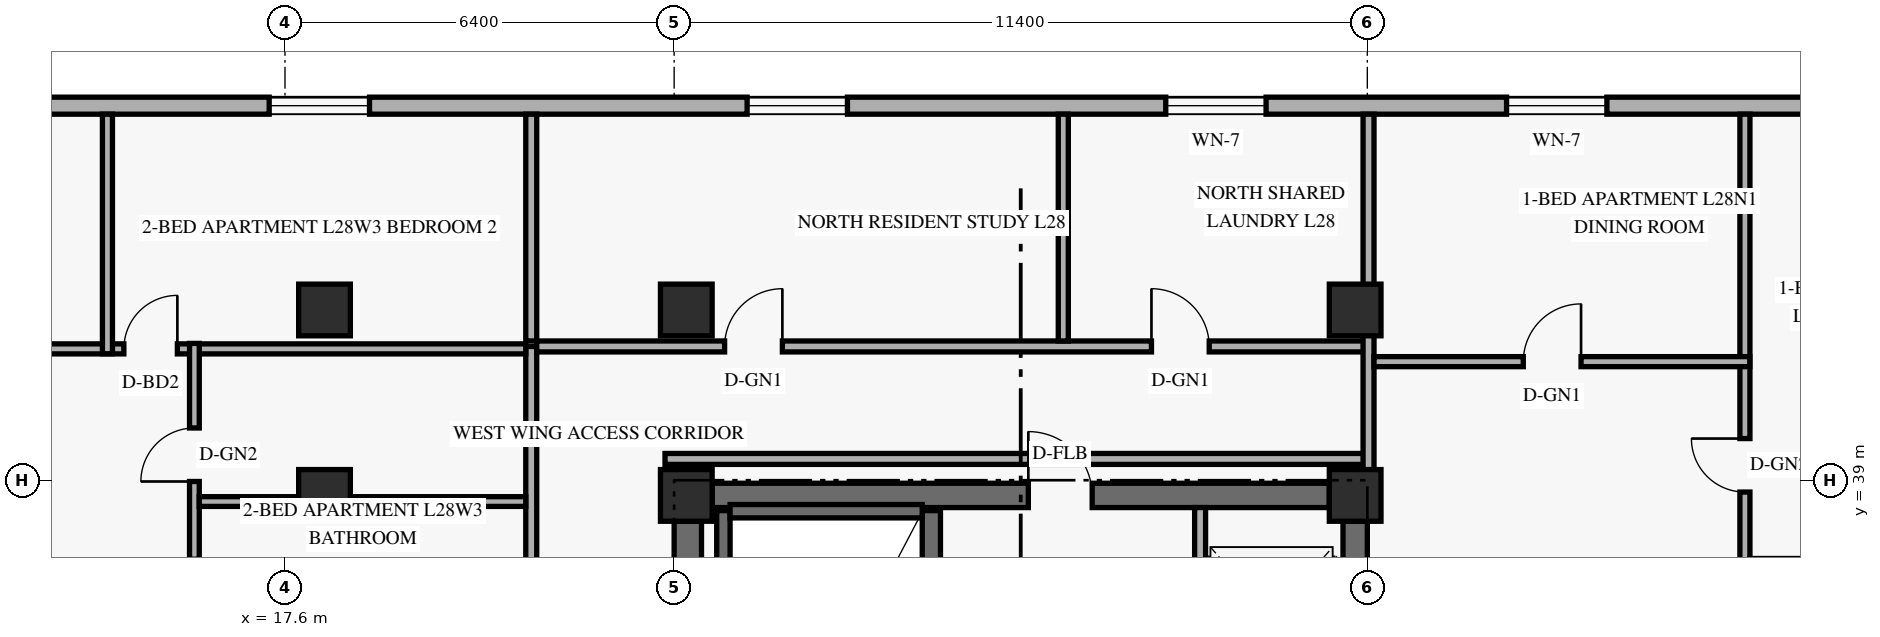
"""IFC4 building model, lengths in metres.
Left out: names, types, materials, properties, quantities, classifications, styles, units other than length and angle.
Written with IfcOpenShell. Run it as: python <this file> out.ifc"""

import sys

from ifc_helpers import new_model, si_unit, direction, frame, frame_2d, origin, origin_2d, place, context, subcontext, project, spatial, rectangle, extrude, element, fill, save


model = new_model("IFC4")
c1 = context("Model", 3, precision=1e-05, world=origin(), true_north=direction((0.0, 1.0)))
c2 = subcontext(c1, "Body", "Model", "MODEL_VIEW")
j1 = project(units=[si_unit("LENGTHUNIT", "METRE"), si_unit("PLANEANGLEUNIT", "RADIAN")], contexts=[c1])
p1 = place(None, origin())
s1 = spatial("IfcSite", under=j1, at=p1, CompositionType="ELEMENT")
p2 = place(p1, origin())
s2 = spatial("IfcBuilding", under=s1, at=p2, CompositionType="ELEMENT")
p3 = place(p2, frame((0.0, 0.0, 109.8)))
s3 = spatial("IfcBuildingStorey", under=s2, at=p3, CompositionType="ELEMENT", Elevation=109.8)
p4 = place(p3, frame((24.225, 30.625, 0.0), z_axis=(0.0, 0.0, 1.0), x_axis=(0.0, 1.0, 0.0)))
e1 = element("IfcWall", 1, at=p4, inside=s3, PredefinedType="SHEAR", context=c2, shape_type="SweptSolid", body=[
    extrude(rectangle(XDim=7.7, YDim=0.45, at=frame_2d((3.85, 0.0))), origin(), (0.0, 0.0, 1.0), 2.749),
])
p5 = place(p3, frame((35.2, 31.35, 0.0), z_axis=(0.0, 0.0, 1.0), x_axis=(0.0, 1.0, 0.0)))
e2 = element("IfcWall", 2, at=p5, inside=s3, PredefinedType="SHEAR", context=c2, shape_type="SweptSolid", body=[
    extrude(rectangle(XDim=6.975, YDim=0.4, at=frame_2d((3.487, 0.0))), origin(), (0.0, 0.0, 1.0), 2.749),
])
p6 = place(p3, frame((24.625, 38.75, 0.0), z_axis=(0.0, 0.0, 1.0), x_axis=(1.0, 0.0, 0.0)))
e3 = element("IfcWall", 3, at=p6, inside=s3, PredefinedType="SHEAR", context=c2, shape_type="SweptSolid", body=[
    extrude(rectangle(XDim=10.15, YDim=0.4, at=frame_2d((5.075, 0.0))), origin(), (0.0, 0.0, 1.0), 3.36),
])
p7 = place(p6, frame((5.2, 0.0, 0.0)))
e4 = element("IfcOpeningElement", 4, at=p7, cuts=e3, PredefinedType="OPENING", context=c2, shape_type="SweptSolid", body=[
    extrude(rectangle(XDim=1.05, YDim=2.15, at=frame_2d((0.525, 1.075))), frame((0.0, 0.21, 0.0), z_axis=(0.0, -1.0, 0.0), x_axis=(1.0, 0.0, 0.0)), (0.0, 0.0, 1.0), 0.42),
])
p8 = place(p3, frame((24.81, 30.74, 0.0), z_axis=(0.0, 0.0, 1.0), x_axis=(0.0, 1.0, 0.0)))
e5 = element("IfcWall", 5, at=p8, inside=s3, PredefinedType="SHEAR", context=c2, shape_type="SweptSolid", body=[
    extrude(rectangle(XDim=7.76, YDim=0.22, at=frame_2d((3.88, 0.0))), origin(), (0.0, 0.0, 1.0), 3.36),
])
p9 = place(p3, frame((28.23, 30.74, 0.0), z_axis=(0.0, 0.0, 1.0), x_axis=(0.0, 1.0, 0.0)))
e6 = element("IfcWall", 6, at=p9, inside=s3, PredefinedType="SHEAR", context=c2, shape_type="SweptSolid", body=[
    extrude(rectangle(XDim=7.76, YDim=0.3, at=frame_2d((3.88, 0.0))), origin(), (0.0, 0.0, 1.0), 3.36),
])
p10 = place(p3, frame((24.92, 38.49, 0.0), z_axis=(0.0, 0.0, 1.0), x_axis=(1.0, 0.0, 0.0)))
e7 = element("IfcWall", 7, at=p10, inside=s3, PredefinedType="SHEAR", context=c2, shape_type="SweptSolid", body=[
    extrude(rectangle(XDim=3.16, YDim=0.22, at=frame_2d((1.58, 0.0))), origin(), (0.0, 0.0, 1.0), 3.36),
])
for number, where, z_axis, x_axis in (
    (8, (18.25, 38.75, 0.0), (0.0, 0.0, 1.0), (1.0, 0.0, 0.0)),
    (9, (18.25, 41.8, 0.0), (0.0, 0.0, 1.0), (1.0, 0.0, 0.0)),
    (10, (24.2, 38.75, 0.0), (0.0, 0.0, 1.0), (1.0, 0.0, 0.0)),
    (11, (24.2, 41.8, 0.0), (0.0, 0.0, 1.0), (1.0, 0.0, 0.0)),
    (12, (35.2, 38.75, 0.0), (0.0, 0.0, 1.0), (1.0, 0.0, 0.0)),
    (13, (35.2, 41.8, 0.0), (0.0, 0.0, 1.0), (1.0, 0.0, 0.0)),
):
    element("IfcColumn", number, at=place(p3, frame(where, z_axis=z_axis, x_axis=x_axis)), inside=s3, PredefinedType="COLUMN", context=c2, shape_type="SweptSolid", body=[
        extrude(rectangle(XDim=0.85, YDim=0.85, at=origin_2d()), origin(), (0.0, 0.0, 1.0), 3.6),
    ])
p11 = place(p3, frame((49.98, 45.16, 0.0), z_axis=(0.0, 0.0, 1.0), x_axis=(-1.0, 0.0, 0.0)))
e14 = element("IfcWall", 14, at=p11, inside=s3, PredefinedType="SOLIDWALL", context=c2, shape_type="SweptSolid", body=[
    extrude(rectangle(XDim=36.56, YDim=0.28, at=frame_2d((18.28, 0.0))), origin(), (0.0, 0.0, 1.0), 3.36),
])
p12 = place(p11, frame((30.99, 0.0, 0.85)))
e15 = element("IfcOpeningElement", 15, at=p12, cuts=e14, PredefinedType="OPENING", context=c2, shape_type="SweptSolid", body=[
    extrude(rectangle(XDim=1.65, YDim=1.6, at=frame_2d((0.825, 0.8))), frame((0.0, 0.15, 0.0), z_axis=(0.0, -1.0, 0.0), x_axis=(1.0, 0.0, 0.0)), (0.0, 0.0, 1.0), 0.3),
])
p13 = place(p11, frame((23.13, 0.0, 0.85)))
e16 = element("IfcOpeningElement", 16, at=p13, cuts=e14, PredefinedType="OPENING", context=c2, shape_type="SweptSolid", body=[
    extrude(rectangle(XDim=1.65, YDim=1.6, at=frame_2d((0.825, 0.8))), frame((0.0, 0.15, 0.0), z_axis=(0.0, -1.0, 0.0), x_axis=(1.0, 0.0, 0.0)), (0.0, 0.0, 1.0), 0.3),
])
p14 = place(p11, frame((16.245, 0.0, 0.85)))
e17 = element("IfcOpeningElement", 17, at=p14, cuts=e14, PredefinedType="OPENING", context=c2, shape_type="SweptSolid", body=[
    extrude(rectangle(XDim=1.65, YDim=1.6, at=frame_2d((0.825, 0.8))), frame((0.0, 0.15, 0.0), z_axis=(0.0, -1.0, 0.0), x_axis=(1.0, 0.0, 0.0)), (0.0, 0.0, 1.0), 0.3),
])
p15 = place(p11, frame((10.64, 0.0, 0.85)))
e18 = element("IfcOpeningElement", 18, at=p15, cuts=e14, PredefinedType="OPENING", context=c2, shape_type="SweptSolid", body=[
    extrude(rectangle(XDim=1.65, YDim=1.6, at=frame_2d((0.825, 0.8))), frame((0.0, 0.15, 0.0), z_axis=(0.0, -1.0, 0.0), x_axis=(1.0, 0.0, 0.0)), (0.0, 0.0, 1.0), 0.3),
])
p16 = place(p11, frame((5.55, 0.0, 0.85)))
e19 = element("IfcOpeningElement", 19, at=p16, cuts=e14, PredefinedType="OPENING", context=c2, shape_type="SweptSolid", body=[
    extrude(rectangle(XDim=1.65, YDim=1.6, at=frame_2d((0.825, 0.8))), frame((0.0, 0.15, 0.0), z_axis=(0.0, -1.0, 0.0), x_axis=(1.0, 0.0, 0.0)), (0.0, 0.0, 1.0), 0.3),
])
p17 = place(p11, frame((2.88, 0.0, 0.85)))
e20 = element("IfcOpeningElement", 20, at=p17, cuts=e14, PredefinedType="OPENING", context=c2, shape_type="SweptSolid", body=[
    extrude(rectangle(XDim=1.2, YDim=1.5, at=frame_2d((0.6, 0.75))), frame((0.0, 0.15, 0.0), z_axis=(0.0, -1.0, 0.0), x_axis=(1.0, 0.0, 0.0)), (0.0, 0.0, 1.0), 0.3),
])
p18 = place(p11, frame((0.465, 0.0, 0.85)))
e21 = element("IfcOpeningElement", 21, at=p18, cuts=e14, PredefinedType="OPENING", context=c2, shape_type="SweptSolid", body=[
    extrude(rectangle(XDim=1.65, YDim=1.6, at=frame_2d((0.825, 0.8))), frame((0.0, 0.15, 0.0), z_axis=(0.0, -1.0, 0.0), x_axis=(1.0, 0.0, 0.0)), (0.0, 0.0, 1.0), 0.3),
])
p19 = place(p3, frame((32.65, 31.35, 0.0), z_axis=(0.0, 0.0, 1.0), x_axis=(0.0, 1.0, 0.0)))
e22 = element("IfcWall", 22, at=p19, inside=s3, PredefinedType="STANDARD", context=c2, shape_type="SweptSolid", body=[
    extrude(rectangle(XDim=7.2, YDim=0.18, at=frame_2d((3.6, 0.0))), origin(), (0.0, 0.0, 1.0), 3.36),
])
p20 = place(p19, frame((0.52, 0.0, 0.0)))
e23 = element("IfcOpeningElement", 23, at=p20, cuts=e22, PredefinedType="OPENING", context=c2, shape_type="SweptSolid", body=[
    extrude(rectangle(XDim=1.05, YDim=2.2, at=frame_2d((0.525, 1.1))), frame((0.0, 0.1, 0.0), z_axis=(0.0, -1.0, 0.0), x_axis=(1.0, 0.0, 0.0)), (0.0, 0.0, 1.0), 0.2),
])
p21 = place(p19, frame((2.67, 0.0, 0.0)))
e24 = element("IfcOpeningElement", 24, at=p21, cuts=e22, PredefinedType="OPENING", context=c2, shape_type="SweptSolid", body=[
    extrude(rectangle(XDim=1.05, YDim=2.2, at=frame_2d((0.525, 1.1))), frame((0.0, 0.1, 0.0), z_axis=(0.0, -1.0, 0.0), x_axis=(1.0, 0.0, 0.0)), (0.0, 0.0, 1.0), 0.2),
])
p22 = place(p19, frame((4.82, 0.0, 0.0)))
e25 = element("IfcOpeningElement", 25, at=p22, cuts=e22, PredefinedType="OPENING", context=c2, shape_type="SweptSolid", body=[
    extrude(rectangle(XDim=1.05, YDim=2.2, at=frame_2d((0.525, 1.1))), frame((0.0, 0.1, 0.0), z_axis=(0.0, -1.0, 0.0), x_axis=(1.0, 0.0, 0.0)), (0.0, 0.0, 1.0), 0.2),
])
p23 = place(p3, frame((21.65, 6.8, 0.0), z_axis=(0.0, 0.0, 1.0), x_axis=(0.0, 1.0, 0.0)))
e26 = element("IfcWall", 26, at=p23, inside=s3, PredefinedType="STANDARD", context=c2, shape_type="SweptSolid", body=[
    extrude(rectangle(XDim=34.4, YDim=0.18, at=frame_2d((17.2, 0.0))), origin(), (0.0, 0.0, 1.0), 2.731),
])
p24 = place(p23, frame((4.785, 0.0, 0.0)))
e27 = element("IfcOpeningElement", 27, at=p24, cuts=e26, PredefinedType="OPENING", context=c2, shape_type="SweptSolid", body=[
    extrude(rectangle(XDim=0.92, YDim=2.15, at=frame_2d((0.46, 1.075))), frame((0.0, 0.1, 0.0), z_axis=(0.0, -1.0, 0.0), x_axis=(1.0, 0.0, 0.0)), (0.0, 0.0, 1.0), 0.2),
])
p25 = place(p23, frame((15.384, 0.0, 0.0)))
e28 = element("IfcOpeningElement", 28, at=p25, cuts=e26, PredefinedType="OPENING", context=c2, shape_type="SweptSolid", body=[
    extrude(rectangle(XDim=0.92, YDim=2.15, at=frame_2d((0.46, 1.075))), frame((0.0, 0.1, 0.0), z_axis=(0.0, -1.0, 0.0), x_axis=(1.0, 0.0, 0.0)), (0.0, 0.0, 1.0), 0.2),
])
p26 = place(p23, frame((28.41, 0.0, 0.0)))
e29 = element("IfcOpeningElement", 29, at=p26, cuts=e26, PredefinedType="OPENING", context=c2, shape_type="SweptSolid", body=[
    extrude(rectangle(XDim=0.92, YDim=2.15, at=frame_2d((0.46, 1.075))), frame((0.0, 0.1, 0.0), z_axis=(0.0, -1.0, 0.0), x_axis=(1.0, 0.0, 0.0)), (0.0, 0.0, 1.0), 0.2),
])
p27 = place(p3, frame((21.74, 41.2, 0.0), z_axis=(0.0, 0.0, 1.0), x_axis=(1.0, 0.0, 0.0)))
e30 = element("IfcWall", 30, at=p27, inside=s3, PredefinedType="STANDARD", context=c2, shape_type="SweptSolid", body=[
    extrude(rectangle(XDim=13.68, YDim=0.18, at=frame_2d((6.84, 0.0))), origin(), (0.0, 0.0, 1.0), 2.731),
])
p28 = place(p27, frame((3.09, 0.0, 0.0)))
e31 = element("IfcOpeningElement", 31, at=p28, cuts=e30, PredefinedType="OPENING", context=c2, shape_type="SweptSolid", body=[
    extrude(rectangle(XDim=0.95, YDim=2.15, at=frame_2d((0.475, 1.075))), frame((0.0, 0.1, 0.0), z_axis=(0.0, -1.0, 0.0), x_axis=(1.0, 0.0, 0.0)), (0.0, 0.0, 1.0), 0.2),
])
p29 = place(p27, frame((10.11, 0.0, 0.0)))
e32 = element("IfcOpeningElement", 32, at=p29, cuts=e30, PredefinedType="OPENING", context=c2, shape_type="SweptSolid", body=[
    extrude(rectangle(XDim=0.95, YDim=2.15, at=frame_2d((0.475, 1.075))), frame((0.0, 0.1, 0.0), z_axis=(0.0, -1.0, 0.0), x_axis=(1.0, 0.0, 0.0)), (0.0, 0.0, 1.0), 0.2),
])
p30 = place(p3, frame((23.85, 39.35, 0.0), z_axis=(0.0, 0.0, 1.0), x_axis=(1.0, 0.0, 0.0)))
e33 = element("IfcWall", 33, at=p30, inside=s3, PredefinedType="STANDARD", context=c2, shape_type="SweptSolid", body=[
    extrude(rectangle(XDim=11.57, YDim=0.18, at=frame_2d((5.785, 0.0))), origin(), (0.0, 0.0, 1.0), 2.731),
])
p31 = place(p3, frame((21.65, 41.29, 0.0), z_axis=(0.0, 0.0, 1.0), x_axis=(0.0, 1.0, 0.0)))
e34 = element("IfcWall", 34, at=p31, inside=s3, PredefinedType="PARTITIONING", context=c2, shape_type="SweptSolid", body=[
    extrude(rectangle(XDim=3.73, YDim=0.18, at=frame_2d((1.865, 0.0))), origin(), (0.0, 0.0, 1.0), 2.809),
])
p32 = place(p3, frame((35.42, 38.75, 0.0), z_axis=(0.0, 0.0, 1.0), x_axis=(0.0, 1.0, 0.0)))
e35 = element("IfcWall", 35, at=p32, inside=s3, PredefinedType="PARTITIONING", context=c2, shape_type="SweptSolid", body=[
    extrude(rectangle(XDim=6.27, YDim=0.18, at=frame_2d((3.135, 0.0))), origin(), (0.0, 0.0, 1.0), 2.731),
])
p33 = place(p3, frame((41.61, 29.55, 0.0), z_axis=(0.0, 0.0, 1.0), x_axis=(0.0, 1.0, 0.0)))
e36 = element("IfcWall", 36, at=p33, inside=s3, PredefinedType="PARTITIONING", context=c2, shape_type="SweptSolid", body=[
    extrude(rectangle(XDim=15.47, YDim=0.165, at=frame_2d((7.735, 0.0))), origin(), (0.0, 0.0, 1.0), 2.731),
])
p34 = place(p33, frame((4.917, 0.0, 0.0)))
e37 = element("IfcOpeningElement", 37, at=p34, cuts=e36, PredefinedType="OPENING", context=c2, shape_type="SweptSolid", body=[
    extrude(rectangle(XDim=0.88, YDim=2.14, at=frame_2d((0.44, 1.07))), frame((0.0, 0.093, 0.0), z_axis=(0.0, -1.0, 0.0), x_axis=(1.0, 0.0, 0.0)), (0.0, 0.0, 1.0), 0.185),
])
p35 = place(p33, frame((9.255, 0.0, 0.0)))
e38 = element("IfcOpeningElement", 38, at=p35, cuts=e36, PredefinedType="OPENING", context=c2, shape_type="SweptSolid", body=[
    extrude(rectangle(XDim=0.88, YDim=2.12, at=frame_2d((0.44, 1.06))), frame((0.0, 0.093, 0.0), z_axis=(0.0, -1.0, 0.0), x_axis=(1.0, 0.0, 0.0)), (0.0, 0.0, 1.0), 0.185),
])
p36 = place(p3, frame((35.51, 40.95, 0.0), z_axis=(0.0, 0.0, 1.0), x_axis=(1.0, 0.0, 0.0)))
e39 = element("IfcWall", 39, at=p36, inside=s3, PredefinedType="PARTITIONING", context=c2, shape_type="SweptSolid", body=[
    extrude(rectangle(XDim=6.18, YDim=0.165, at=frame_2d((3.09, 0.0))), origin(), (0.0, 0.0, 1.0), 3.36),
])
p37 = place(p36, frame((2.455, 0.0, 0.0)))
e40 = element("IfcOpeningElement", 40, at=p37, cuts=e39, PredefinedType="OPENING", context=c2, shape_type="SweptSolid", body=[
    extrude(rectangle(XDim=0.95, YDim=2.15, at=frame_2d((0.475, 1.075))), frame((0.0, 0.093, 0.0), z_axis=(0.0, -1.0, 0.0), x_axis=(1.0, 0.0, 0.0)), (0.0, 0.0, 1.0), 0.185),
])
p38 = place(p3, frame((10.08, 41.16, 0.0), z_axis=(0.0, 0.0, 1.0), x_axis=(1.0, 0.0, 0.0)))
e41 = element("IfcWall", 41, at=p38, inside=s3, PredefinedType="PARTITIONING", context=c2, shape_type="SweptSolid", body=[
    extrude(rectangle(XDim=11.48, YDim=0.165, at=frame_2d((5.74, 0.0))), origin(), (0.0, 0.0, 1.0), 2.731),
])
p39 = place(p38, frame((1.75, 0.0, 0.0)))
e42 = element("IfcOpeningElement", 42, at=p39, cuts=e41, PredefinedType="OPENING", context=c2, shape_type="SweptSolid", body=[
    extrude(rectangle(XDim=0.88, YDim=2.14, at=frame_2d((0.44, 1.07))), frame((0.0, 0.093, 0.0), z_axis=(0.0, -1.0, 0.0), x_axis=(1.0, 0.0, 0.0)), (0.0, 0.0, 1.0), 0.185),
])
p40 = place(p38, frame((4.87, 0.0, 0.0)))
e43 = element("IfcOpeningElement", 43, at=p40, cuts=e41, PredefinedType="OPENING", context=c2, shape_type="SweptSolid", body=[
    extrude(rectangle(XDim=0.88, YDim=2.14, at=frame_2d((0.44, 1.07))), frame((0.0, 0.093, 0.0), z_axis=(0.0, -1.0, 0.0), x_axis=(1.0, 0.0, 0.0)), (0.0, 0.0, 1.0), 0.185),
])
p41 = place(p3, frame((16.11, 36.42, 0.0), z_axis=(0.0, 0.0, 1.0), x_axis=(0.0, 1.0, 0.0)))
e44 = element("IfcWall", 44, at=p41, inside=s3, PredefinedType="PLUMBINGWALL", context=c2, shape_type="SweptSolid", body=[
    extrude(rectangle(XDim=4.83, YDim=0.16, at=frame_2d((2.415, 0.0))), origin(), (0.0, 0.0, 1.0), 2.731),
])
p42 = place(p41, frame((0.42, 0.0, 0.0)))
e45 = element("IfcOpeningElement", 45, at=p42, cuts=e44, PredefinedType="OPENING", context=c2, shape_type="SweptSolid", body=[
    extrude(rectangle(XDim=0.86, YDim=2.12, at=frame_2d((0.43, 1.06))), frame((0.0, 0.09, 0.0), z_axis=(0.0, -1.0, 0.0), x_axis=(1.0, 0.0, 0.0)), (0.0, 0.0, 1.0), 0.18),
])
p43 = place(p41, frame((2.559, 0.0, 0.0)))
e46 = element("IfcOpeningElement", 46, at=p43, cuts=e44, PredefinedType="OPENING", context=c2, shape_type="SweptSolid", body=[
    extrude(rectangle(XDim=0.88, YDim=2.12, at=frame_2d((0.44, 1.06))), frame((0.0, 0.09, 0.0), z_axis=(0.0, -1.0, 0.0), x_axis=(1.0, 0.0, 0.0)), (0.0, 0.0, 1.0), 0.18),
])
p44 = place(p3, frame((16.19, 38.649, 0.0), z_axis=(0.0, 0.0, 1.0), x_axis=(1.0, 0.0, 0.0)))
e47 = element("IfcWall", 47, at=p44, inside=s3, PredefinedType="PLUMBINGWALL", context=c2, shape_type="SweptSolid", body=[
    extrude(rectangle(XDim=5.37, YDim=0.16, at=frame_2d((2.685, 0.0))), origin(), (0.0, 0.0, 1.0), 2.731),
])
p45 = place(p3, frame((14.68, 41.08, 0.0), z_axis=(0.0, 0.0, 1.0), x_axis=(0.0, 1.0, 0.0)))
e48 = element("IfcWall", 48, at=p45, inside=s3, PredefinedType="PARTITIONING", context=c2, shape_type="SweptSolid", body=[
    extrude(rectangle(XDim=3.94, YDim=0.165, at=frame_2d((1.97, 0.0))), origin(), (0.0, 0.0, 1.0), 2.809),
])
p46 = place(p3, frame((30.4, 41.29, 0.0), z_axis=(0.0, 0.0, 1.0), x_axis=(0.0, 1.0, 0.0)))
e49 = element("IfcWall", 49, at=p46, inside=s3, PredefinedType="PARTITIONING", context=c2, shape_type="SweptSolid", body=[
    extrude(rectangle(XDim=3.73, YDim=0.165, at=frame_2d((1.865, 0.0))), origin(), (0.0, 0.0, 1.0), 2.809),
])
p47 = place(p12, origin())
e50 = element("IfcWindow", 50, at=p47, inside=s3, PartitioningType="SINGLE_PANEL", PredefinedType="WINDOW", context=c2, shape_type="SweptSolid", body=[
    extrude(rectangle(XDim=1.65, YDim=1.6, at=frame_2d((0.825, 0.8))), frame((0.0, 0.03, 0.0), z_axis=(0.0, -1.0, 0.0), x_axis=(1.0, 0.0, 0.0)), (0.0, 0.0, 1.0), 0.06),
])
fill(e15, e50)
p48 = place(p13, origin())
e51 = element("IfcWindow", 51, at=p48, inside=s3, PartitioningType="SINGLE_PANEL", PredefinedType="WINDOW", context=c2, shape_type="SweptSolid", body=[
    extrude(rectangle(XDim=1.65, YDim=1.6, at=frame_2d((0.825, 0.8))), frame((0.0, 0.03, 0.0), z_axis=(0.0, -1.0, 0.0), x_axis=(1.0, 0.0, 0.0)), (0.0, 0.0, 1.0), 0.06),
])
fill(e16, e51)
p49 = place(p14, origin())
e52 = element("IfcWindow", 52, at=p49, inside=s3, PartitioningType="SINGLE_PANEL", PredefinedType="WINDOW", context=c2, shape_type="SweptSolid", body=[
    extrude(rectangle(XDim=1.65, YDim=1.6, at=frame_2d((0.825, 0.8))), frame((0.0, 0.03, 0.0), z_axis=(0.0, -1.0, 0.0), x_axis=(1.0, 0.0, 0.0)), (0.0, 0.0, 1.0), 0.06),
])
fill(e17, e52)
p50 = place(p15, origin())
e53 = element("IfcWindow", 53, at=p50, inside=s3, PartitioningType="SINGLE_PANEL", PredefinedType="WINDOW", context=c2, shape_type="SweptSolid", body=[
    extrude(rectangle(XDim=1.65, YDim=1.6, at=frame_2d((0.825, 0.8))), frame((0.0, 0.03, 0.0), z_axis=(0.0, -1.0, 0.0), x_axis=(1.0, 0.0, 0.0)), (0.0, 0.0, 1.0), 0.06),
])
fill(e18, e53)
p51 = place(p7, frame((1.05, 0.0, 0.0), z_axis=(0.0, 0.0, 1.0), x_axis=(-1.0, 0.0, 0.0)))
e54 = element("IfcDoor", 54, at=p51, inside=s3, OperationType="SINGLE_SWING_RIGHT", PredefinedType="DOOR", context=c2, shape_type="SweptSolid", body=[
    extrude(rectangle(XDim=1.05, YDim=2.15, at=frame_2d((0.525, 1.075))), frame((0.0, 0.025, 0.0), z_axis=(0.0, -1.0, 0.0), x_axis=(1.0, 0.0, 0.0)), (0.0, 0.0, 1.0), 0.05),
])
fill(e4, e54)
p52 = place(p37, origin())
e55 = element("IfcDoor", 55, at=p52, inside=s3, OperationType="SINGLE_SWING_RIGHT", PredefinedType="DOOR", context=c2, shape_type="SweptSolid", body=[
    extrude(rectangle(XDim=0.95, YDim=2.15, at=frame_2d((0.475, 1.075))), frame((0.0, 0.025, 0.0), z_axis=(0.0, -1.0, 0.0), x_axis=(1.0, 0.0, 0.0)), (0.0, 0.0, 1.0), 0.05),
])
fill(e40, e55)
p53 = place(p35, origin())
e56 = element("IfcDoor", 56, at=p53, inside=s3, OperationType="SINGLE_SWING_RIGHT", PredefinedType="DOOR", context=c2, shape_type="SweptSolid", body=[
    extrude(rectangle(XDim=0.88, YDim=2.12, at=frame_2d((0.44, 1.06))), frame((0.0, 0.025, 0.0), z_axis=(0.0, -1.0, 0.0), x_axis=(1.0, 0.0, 0.0)), (0.0, 0.0, 1.0), 0.05),
])
fill(e38, e56)
p54 = place(p43, origin())
e57 = element("IfcDoor", 57, at=p54, inside=s3, OperationType="SINGLE_SWING_LEFT", PredefinedType="DOOR", context=c2, shape_type="SweptSolid", body=[
    extrude(rectangle(XDim=0.88, YDim=2.12, at=frame_2d((0.44, 1.06))), frame((0.0, 0.025, 0.0), z_axis=(0.0, -1.0, 0.0), x_axis=(1.0, 0.0, 0.0)), (0.0, 0.0, 1.0), 0.05),
])
fill(e46, e57)
p55 = place(p40, origin())
e58 = element("IfcDoor", 58, at=p55, inside=s3, OperationType="SINGLE_SWING_RIGHT", PredefinedType="DOOR", context=c2, shape_type="SweptSolid", body=[
    extrude(rectangle(XDim=0.88, YDim=2.14, at=frame_2d((0.44, 1.07))), frame((0.0, 0.025, 0.0), z_axis=(0.0, -1.0, 0.0), x_axis=(1.0, 0.0, 0.0)), (0.0, 0.0, 1.0), 0.05),
])
fill(e43, e58)
p56 = place(p28, origin())
e59 = element("IfcDoor", 59, at=p56, inside=s3, OperationType="SINGLE_SWING_RIGHT", PredefinedType="DOOR", context=c2, shape_type="SweptSolid", body=[
    extrude(rectangle(XDim=0.95, YDim=2.15, at=frame_2d((0.475, 1.075))), frame((0.0, 0.025, 0.0), z_axis=(0.0, -1.0, 0.0), x_axis=(1.0, 0.0, 0.0)), (0.0, 0.0, 1.0), 0.05),
])
fill(e31, e59)
p57 = place(p29, origin())
e60 = element("IfcDoor", 60, at=p57, inside=s3, OperationType="SINGLE_SWING_LEFT", PredefinedType="DOOR", context=c2, shape_type="SweptSolid", body=[
    extrude(rectangle(XDim=0.95, YDim=2.15, at=frame_2d((0.475, 1.075))), frame((0.0, 0.025, 0.0), z_axis=(0.0, -1.0, 0.0), x_axis=(1.0, 0.0, 0.0)), (0.0, 0.0, 1.0), 0.05),
])
fill(e32, e60)
save(model, sys.argv[1])
